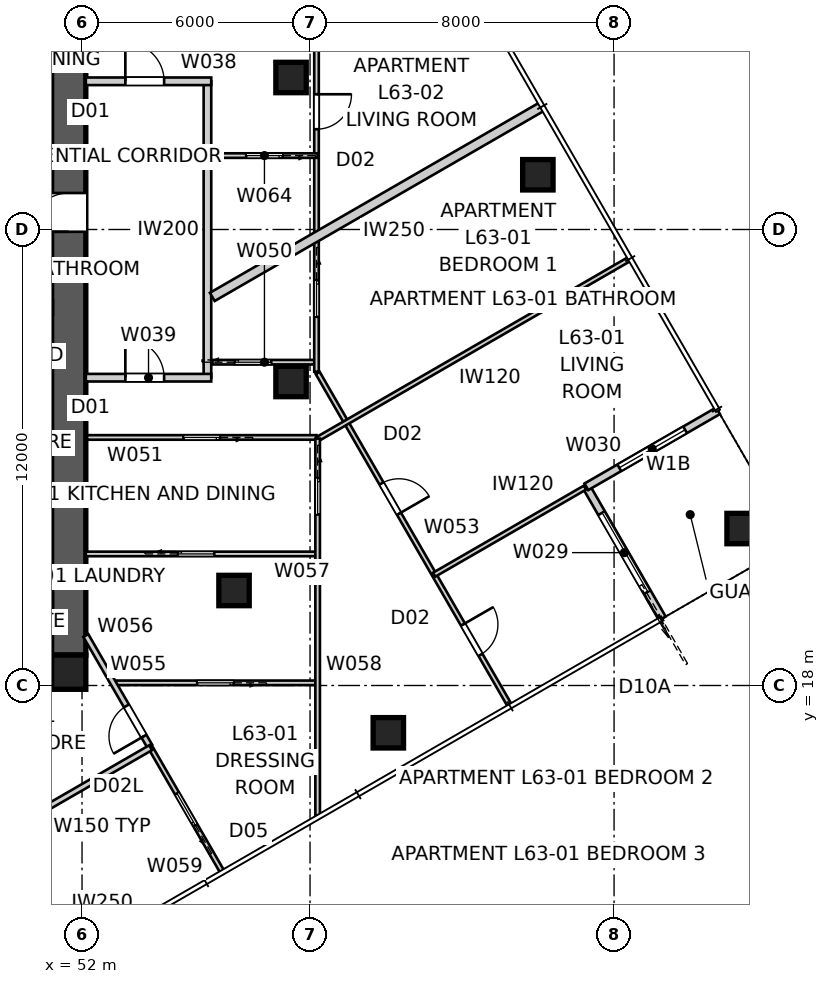
"""IFC4 building model, lengths in metres.
Left out: names, types, materials, properties, quantities, classifications, styles, units other than length and angle.
Written with IfcOpenShell. Run it as: python <this file> out.ifc"""

import sys

from ifc_helpers import new_model, si_unit, direction, frame, frame_2d, origin, origin_2d, place, context, subcontext, project, spatial, polyline, rectangle, outline, extrude, element, fill, save


model = new_model("IFC4")
c1 = context("Model", 3, precision=1e-05, world=origin(), true_north=direction((0.0, 1.0)))
c2 = subcontext(c1, "Body", "Model", "MODEL_VIEW")
j1 = project(units=[si_unit("LENGTHUNIT", "METRE"), si_unit("PLANEANGLEUNIT", "RADIAN")], contexts=[c1])
p1 = place(None, origin())
s1 = spatial("IfcSite", under=j1, at=p1, CompositionType="ELEMENT")
p2 = place(p1, origin())
s2 = spatial("IfcBuilding", under=s1, at=p2, CompositionType="ELEMENT")
p3 = place(p2, frame((0.0, 0.0, 228.6)))
s3 = spatial("IfcBuildingStorey", under=s2, at=p3, CompositionType="ELEMENT", Elevation=228.6)
p4 = place(p3, frame((51.2, 18.35, 0.0), z_axis=(0.0, 0.0, 1.0), x_axis=(-1.0, 0.0, 0.0)))
e1 = element("IfcWall", 1, at=p4, inside=s3, PredefinedType="SHEAR", context=c2, shape_type="SweptSolid", body=[
    extrude(outline(polyline([(0.0, -0.45), (22.4, -0.45), (22.4, -0.025), (22.85, -0.025), (22.85, 0.025), (22.4, 0.025), (22.4, 0.45), (0.0, 0.45), (0.0, 0.025), (-0.45, 0.025), (-0.45, -0.025), (0.0, -0.025), (0.0, -0.45)])), origin(), (0.0, 0.0, 1.0), 3.4),
])
p5 = place(p3, frame((51.65, 18.8, 0.0), z_axis=(0.0, 0.0, 1.0), x_axis=(0.0, 1.0, 0.0)))
e2 = element("IfcWall", 2, at=p5, inside=s3, PredefinedType="SHEAR", context=c2, shape_type="SweptSolid", body=[
    extrude(outline(polyline([(0.0, -0.45), (22.4, -0.45), (22.4, -0.025), (22.85, -0.025), (22.85, 0.025), (22.4, 0.025), (22.4, 0.45), (0.0, 0.45), (0.0, 0.025), (-0.45, 0.025), (-0.45, -0.025), (0.0, -0.025), (0.0, -0.45)])), origin(), (0.0, 0.0, 1.0), 3.4),
])
p6 = place(p5, frame((11.14, 0.0, 0.0)))
e3 = element("IfcOpeningElement", 3, at=p6, cuts=e2, PredefinedType="OPENING", context=c2, shape_type="SweptSolid", body=[
    extrude(rectangle(XDim=1.02, YDim=2.4, at=frame_2d((0.51, 1.2))), frame((0.0, 0.46, 0.0), z_axis=(0.0, -1.0, 0.0), x_axis=(1.0, 0.0, 0.0)), (0.0, 0.0, 1.0), 0.92),
])
p7 = place(p3, frame((51.65, 18.35, 0.0), z_axis=(0.0, 0.0, 1.0), x_axis=(1.0, 0.0, 0.0)))
e4 = element("IfcColumn", 4, at=p7, inside=s3, PredefinedType="COLUMN", context=c2, shape_type="SweptSolid", body=[
    extrude(rectangle(XDim=0.9, YDim=0.9, at=origin_2d()), origin(), (0.0, 0.0, 1.0), 3.4),
])
for number, where, z_axis, x_axis in (
    (5, (60.06, 16.755, 0.0), (0.0, 0.0, 1.0), (1.0, 0.0, 0.0)),
    (6, (69.37, 22.13, 0.0), (0.0, 0.0, 1.0), (1.0, 0.0, 0.0)),
    (7, (63.995, 31.44, 0.0), (0.0, 0.0, 1.0), (1.0, 0.0, 0.0)),
    (8, (57.5, 26.0, 0.0), (0.0, 0.0, 1.0), (1.0, 0.0, 0.0)),
    (9, (57.5, 34.0, 0.0), (0.0, 0.0, 1.0), (1.0, 0.0, 0.0)),
    (10, (56.0, 20.5, 0.0), (0.0, 0.0, 1.0), (1.0, 0.0, 0.0)),
):
    element("IfcColumn", number, at=place(p3, frame(where, z_axis=z_axis, x_axis=x_axis)), inside=s3, PredefinedType="COLUMN", context=c2, shape_type="SweptSolid", body=[
        extrude(rectangle(XDim=0.8, YDim=0.8, at=origin_2d()), origin(), (0.0, 0.0, 1.0), 3.4),
    ])
p8 = place(p3, frame((67.271, 19.764, 0.0), z_axis=(0.0, 0.0, 1.0), x_axis=(-0.49999894854, 0.866026010844, 0.0)))
e11 = element("IfcWall", 11, at=p8, inside=s3, PredefinedType="SOLIDWALL", context=c2, shape_type="SweptSolid", body=[
    extrude(rectangle(XDim=4.0, YDim=0.2, at=frame_2d((2.0, 0.0))), origin(), (0.0, 0.0, 1.0), 3.25),
])
p9 = place(p8, frame((0.8, 0.0, 0.0)))
e12 = element("IfcOpeningElement", 12, at=p9, cuts=e11, PredefinedType="OPENING", context=c2, shape_type="SweptSolid", body=[
    extrude(rectangle(XDim=2.4, YDim=2.1, at=frame_2d((1.2, 1.05))), frame((0.0, 0.11, 0.0), z_axis=(0.0, -1.0, 0.0), x_axis=(1.0, 0.0, 0.0)), (0.0, 0.0, 1.0), 0.22),
])
p10 = place(p3, frame((65.271, 23.229, 0.0), z_axis=(0.0, 0.0, 1.0), x_axis=(0.866026010844, 0.49999894854, 0.0)))
e13 = element("IfcWall", 13, at=p10, inside=s3, PredefinedType="SOLIDWALL", context=c2, shape_type="SweptSolid", body=[
    extrude(rectangle(XDim=4.0, YDim=0.2, at=frame_2d((2.0, 0.0))), origin(), (0.0, 0.0, 1.0), 3.25),
])
p11 = place(p10, frame((1.0, 0.0, 0.45)))
e14 = element("IfcOpeningElement", 14, at=p11, cuts=e13, PredefinedType="OPENING", context=c2, shape_type="SweptSolid", body=[
    extrude(rectangle(XDim=2.0, YDim=1.8, at=frame_2d((1.0, 0.9))), frame((0.0, 0.11, 0.0), z_axis=(0.0, -1.0, 0.0), x_axis=(1.0, 0.0, 0.0)), (0.0, 0.0, 1.0), 0.22),
])
p12 = place(p3, frame((55.3, 26.1, 0.0), z_axis=(0.0, 0.0, 1.0), x_axis=(0.0, 1.0, 0.0)))
e15 = element("IfcWall", 15, at=p12, inside=s3, PredefinedType="PARTITIONING", context=c2, shape_type="SweptSolid", body=[
    extrude(rectangle(XDim=7.8, YDim=0.2, at=frame_2d((3.9, 0.0))), origin(), (0.0, 0.0, 1.0), 3.25),
])
p13 = place(p3, frame((52.1, 33.9, 0.0), z_axis=(0.0, 0.0, 1.0), x_axis=(1.0, 0.0, 0.0)))
e16 = element("IfcWall", 16, at=p13, inside=s3, PredefinedType="PARTITIONING", context=c2, shape_type="SweptSolid", body=[
    extrude(rectangle(XDim=3.3, YDim=0.2, at=frame_2d((1.65, 0.0))), origin(), (0.0, 0.0, 1.0), 3.25),
])
p14 = place(p13, frame((1.04, 0.0, 0.0)))
e17 = element("IfcOpeningElement", 17, at=p14, cuts=e16, PredefinedType="OPENING", context=c2, shape_type="SweptSolid", body=[
    extrude(rectangle(XDim=1.02, YDim=2.34, at=frame_2d((0.51, 1.17))), frame((0.0, 0.11, 0.0), z_axis=(0.0, -1.0, 0.0), x_axis=(1.0, 0.0, 0.0)), (0.0, 0.0, 1.0), 0.22),
])
p15 = place(p3, frame((52.1, 26.1, 0.0), z_axis=(0.0, 0.0, 1.0), x_axis=(1.0, 0.0, 0.0)))
e18 = element("IfcWall", 18, at=p15, inside=s3, PredefinedType="PARTITIONING", context=c2, shape_type="SweptSolid", body=[
    extrude(rectangle(XDim=3.3, YDim=0.2, at=frame_2d((1.65, 0.0))), origin(), (0.0, 0.0, 1.0), 3.25),
])
p16 = place(p15, frame((1.04, 0.0, 0.0)))
e19 = element("IfcOpeningElement", 19, at=p16, cuts=e18, PredefinedType="OPENING", context=c2, shape_type="SweptSolid", body=[
    extrude(rectangle(XDim=1.02, YDim=2.34, at=frame_2d((0.51, 1.17))), frame((0.0, 0.11, 0.0), z_axis=(0.0, -1.0, 0.0), x_axis=(1.0, 0.0, 0.0)), (0.0, 0.0, 1.0), 0.22),
])
p17 = place(p3, frame((64.111, 33.239, 0.0), z_axis=(0.0, 0.0, 1.0), x_axis=(-0.866024190901, -0.50000210077, 0.0)))
e20 = element("IfcWall", 20, at=p17, inside=s3, PredefinedType="PARTITIONING", context=c2, shape_type="SweptSolid", body=[
    extrude(rectangle(XDim=10.026, YDim=0.25, at=frame_2d((5.013, 0.0))), origin(), (0.0, 0.0, 1.0), 3.25),
])
p18 = place(p3, frame((51.25, 10.514, 0.0), z_axis=(0.0, 0.0, 1.0), x_axis=(-0.500008511703, 0.866020489494, 0.0)))
e21 = element("IfcWall", 21, at=p18, inside=s3, PredefinedType="PARTITIONING", context=c2, shape_type="SweptSolid", body=[
    extrude(rectangle(XDim=8.496, YDim=0.25, at=frame_2d((4.248, 0.0))), origin(), (0.0, 0.0, 1.0), 3.25),
])
p19 = place(p3, frame((55.43, 26.508, 0.0), z_axis=(0.0, 0.0, 1.0), x_axis=(1.0, 0.0, 0.0)))
e22 = element("IfcWall", 22, at=p19, inside=s3, PredefinedType="PARTITIONING", context=c2, shape_type="SweptSolid", body=[
    extrude(rectangle(XDim=2.74, YDim=0.12, at=frame_2d((1.37, 0.0))), origin(), (0.0, 0.0, 1.0), 3.25),
])
p20 = place(p19, frame((0.59, 0.0, 0.0)))
e23 = element("IfcOpeningElement", 23, at=p20, cuts=e22, PredefinedType="OPENING", context=c2, shape_type="SweptSolid", body=[
    extrude(rectangle(XDim=0.96, YDim=2.1, at=frame_2d((0.48, 1.05))), frame((0.0, 0.07, 0.0), z_axis=(0.0, -1.0, 0.0), x_axis=(1.0, 0.0, 0.0)), (0.0, 0.0, 1.0), 0.14),
])
p21 = place(p3, frame((58.17, 24.528, 0.0), z_axis=(0.0, 0.0, 1.0), x_axis=(-1.0, 0.0, 0.0)))
e24 = element("IfcWall", 24, at=p21, inside=s3, PredefinedType="PARTITIONING", context=c2, shape_type="SweptSolid", body=[
    extrude(rectangle(XDim=6.04, YDim=0.12, at=frame_2d((3.02, 0.0))), origin(), (0.0, 0.0, 1.0), 2.35),
])
p22 = place(p21, frame((2.54, 0.0, 0.0)))
e25 = element("IfcOpeningElement", 25, at=p22, cuts=e24, PredefinedType="OPENING", context=c2, shape_type="SweptSolid", body=[
    extrude(rectangle(XDim=0.96, YDim=2.1, at=frame_2d((0.48, 1.05))), frame((0.0, 0.07, 0.0), z_axis=(0.0, -1.0, 0.0), x_axis=(1.0, 0.0, 0.0)), (0.0, 0.0, 1.0), 0.14),
])
p23 = place(p3, frame((58.171, 40.491, 0.0), z_axis=(0.0, 0.0, 1.0), x_axis=(-5.1455328e-05, -0.999999998676, 0.0)))
e26 = element("IfcWall", 26, at=p23, inside=s3, PredefinedType="PARTITIONING", context=c2, shape_type="SweptSolid", body=[
    extrude(rectangle(XDim=14.234, YDim=0.12, at=frame_2d((7.117, 0.0))), origin(), (0.0, 0.0, 1.0), 3.25),
])
p24 = place(p23, frame((6.932, 0.0, 0.0)))
e27 = element("IfcOpeningElement", 27, at=p24, cuts=e26, PredefinedType="OPENING", context=c2, shape_type="SweptSolid", body=[
    extrude(rectangle(XDim=0.92, YDim=2.34, at=frame_2d((0.46, 1.17))), frame((0.0, 0.07, 0.0), z_axis=(0.0, -1.0, 0.0), x_axis=(1.0, 0.0, 0.0)), (0.0, 0.0, 1.0), 0.14),
])
p25 = place(p23, frame((11.829, 0.0, 0.0)))
e28 = element("IfcOpeningElement", 28, at=p25, cuts=e26, PredefinedType="OPENING", context=c2, shape_type="SweptSolid", body=[
    extrude(rectangle(XDim=0.96, YDim=2.1, at=frame_2d((0.48, 1.05))), frame((0.0, 0.07, 0.0), z_axis=(0.0, -1.0, 0.0), x_axis=(1.0, 0.0, 0.0)), (0.0, 0.0, 1.0), 0.14),
])
p26 = place(p23, frame((1.964, 0.0, 0.0)))
e29 = element("IfcOpeningElement", 29, at=p26, cuts=e26, PredefinedType="OPENING", context=c2, shape_type="SweptSolid", body=[
    extrude(rectangle(XDim=0.96, YDim=2.1, at=frame_2d((0.48, 1.05))), frame((0.0, 0.07, 0.0), z_axis=(0.0, -1.0, 0.0), x_axis=(1.0, 0.0, 0.0)), (0.0, 0.0, 1.0), 0.14),
])
p27 = place(p3, frame((58.2, 26.226, 0.0), z_axis=(0.0, 0.0, 1.0), x_axis=(0.499992604493, -0.86602967354, 0.0)))
e30 = element("IfcWall", 30, at=p27, inside=s3, PredefinedType="PARTITIONING", context=c2, shape_type="SweptSolid", body=[
    extrude(rectangle(XDim=10.092, YDim=0.12, at=frame_2d((5.046, 0.0))), origin(), (0.0, 0.0, 1.0), 3.25),
])
p28 = place(p27, frame((3.359, 0.0, 0.0)))
e31 = element("IfcOpeningElement", 31, at=p28, cuts=e30, PredefinedType="OPENING", context=c2, shape_type="SweptSolid", body=[
    extrude(rectangle(XDim=0.92, YDim=2.34, at=frame_2d((0.46, 1.17))), frame((0.0, 0.07, 0.0), z_axis=(0.0, -1.0, 0.0), x_axis=(1.0, 0.0, 0.0)), (0.0, 0.0, 1.0), 0.14),
])
p29 = place(p27, frame((7.646, 0.0, 0.0)))
e32 = element("IfcOpeningElement", 32, at=p29, cuts=e30, PredefinedType="OPENING", context=c2, shape_type="SweptSolid", body=[
    extrude(rectangle(XDim=0.92, YDim=2.34, at=frame_2d((0.46, 1.17))), frame((0.0, 0.07, 0.0), z_axis=(0.0, -1.0, 0.0), x_axis=(1.0, 0.0, 0.0)), (0.0, 0.0, 1.0), 0.14),
])
p30 = place(p3, frame((66.388, 29.214, 0.0), z_axis=(0.0, 0.0, 1.0), x_axis=(-0.86602907136, -0.49999364752, 0.0)))
e33 = element("IfcWall", 33, at=p30, inside=s3, PredefinedType="PARTITIONING", context=c2, shape_type="SweptSolid", body=[
    extrude(rectangle(XDim=9.455, YDim=0.12, at=frame_2d((4.728, 0.0))), origin(), (0.0, 0.0, 1.0), 3.25),
])
p31 = place(p3, frame((58.2, 18.07, 0.0), z_axis=(0.0, 0.0, 1.0), x_axis=(-1.0, 0.0, 0.0)))
e34 = element("IfcWall", 34, at=p31, inside=s3, PredefinedType="PARTITIONING", context=c2, shape_type="SweptSolid", body=[
    extrude(rectangle(XDim=5.381, YDim=0.12, at=frame_2d((2.691, 0.0))), origin(), (0.0, 0.0, 1.0), 3.25),
])
p32 = place(p31, frame((2.211, 0.0, 0.0)))
e35 = element("IfcOpeningElement", 35, at=p32, cuts=e34, PredefinedType="OPENING", context=c2, shape_type="SweptSolid", body=[
    extrude(rectangle(XDim=0.96, YDim=2.1, at=frame_2d((0.48, 1.05))), frame((0.0, 0.07, 0.0), z_axis=(0.0, -1.0, 0.0), x_axis=(1.0, 0.0, 0.0)), (0.0, 0.0, 1.0), 0.14),
])
p33 = place(p3, frame((53.779, 16.406, 0.0), z_axis=(0.0, 0.0, 1.0), x_axis=(-0.499969954228, 0.866042750024, 0.0)))
e36 = element("IfcWall", 36, at=p33, inside=s3, PredefinedType="SOLIDWALL", context=c2, shape_type="SweptSolid", body=[
    extrude(rectangle(XDim=3.359, YDim=0.15, at=frame_2d((1.679, 0.0))), origin(), (0.0, 0.0, 1.0), 3.25),
])
p34 = place(p33, frame((0.301, 0.0, 0.0)))
e37 = element("IfcOpeningElement", 37, at=p34, cuts=e36, PredefinedType="OPENING", context=c2, shape_type="SweptSolid", body=[
    extrude(rectangle(XDim=0.92, YDim=2.1, at=frame_2d((0.46, 1.05))), frame((0.0, 0.085, 0.0), z_axis=(0.0, -1.0, 0.0), x_axis=(1.0, 0.0, 0.0)), (0.0, 0.0, 1.0), 0.17),
])
p35 = place(p3, frame((52.1, 21.462, 0.0), z_axis=(0.0, 0.0, 1.0), x_axis=(1.0, 0.0, 0.0)))
e38 = element("IfcWall", 38, at=p35, inside=s3, PredefinedType="PARTITIONING", context=c2, shape_type="SweptSolid", body=[
    extrude(rectangle(XDim=6.1, YDim=0.12, at=frame_2d((3.05, 0.0))), origin(), (0.0, 0.0, 1.0), 3.25),
])
p36 = place(p35, frame((2.42, 0.0, 0.0)))
e39 = element("IfcOpeningElement", 39, at=p36, cuts=e38, PredefinedType="OPENING", context=c2, shape_type="SweptSolid", body=[
    extrude(rectangle(XDim=0.96, YDim=2.1, at=frame_2d((0.48, 1.05))), frame((0.0, 0.07, 0.0), z_axis=(0.0, -1.0, 0.0), x_axis=(1.0, 0.0, 0.0)), (0.0, 0.0, 1.0), 0.14),
])
p37 = place(p3, frame((58.2, 24.498, 0.0), z_axis=(0.0, 0.0, 1.0), x_axis=(0.0, -1.0, 0.0)))
e40 = element("IfcWall", 40, at=p37, inside=s3, PredefinedType="PARTITIONING", context=c2, shape_type="SweptSolid", body=[
    extrude(rectangle(XDim=9.925, YDim=0.12, at=frame_2d((4.962, 0.0))), origin(), (0.0, 0.0, 1.0), 3.25),
])
p38 = place(p37, frame((1.038, 0.0, 0.0)))
e41 = element("IfcOpeningElement", 41, at=p38, cuts=e40, PredefinedType="OPENING", context=c2, shape_type="SweptSolid", body=[
    extrude(rectangle(XDim=0.96, YDim=2.1, at=frame_2d((0.48, 1.05))), frame((0.0, 0.07, 0.0), z_axis=(0.0, -1.0, 0.0), x_axis=(1.0, 0.0, 0.0)), (0.0, 0.0, 1.0), 0.14),
])
p39 = place(p3, frame((55.678, 13.117, 0.0), z_axis=(0.0, 0.0, 1.0), x_axis=(-0.500024807712, 0.866011080572, 0.0)))
e42 = element("IfcWall", 42, at=p39, inside=s3, PredefinedType="PARTITIONING", context=c2, shape_type="SweptSolid", body=[
    extrude(rectangle(XDim=3.798, YDim=0.12, at=frame_2d((1.899, 0.0))), origin(), (0.0, 0.0, 1.0), 3.25),
])
p40 = place(p39, frame((1.399, 0.0, 0.0)))
e43 = element("IfcOpeningElement", 43, at=p40, cuts=e42, PredefinedType="OPENING", context=c2, shape_type="SweptSolid", body=[
    extrude(rectangle(XDim=0.96, YDim=2.1, at=frame_2d((0.48, 1.05))), frame((0.0, 0.07, 0.0), z_axis=(0.0, -1.0, 0.0), x_axis=(1.0, 0.0, 0.0)), (0.0, 0.0, 1.0), 0.14),
])
p41 = place(p3, frame((49.955, 14.14, 0.0), z_axis=(0.0, 0.0, 1.0), x_axis=(0.866017295027, 0.500014044516, 0.0)))
e44 = element("IfcWall", 44, at=p41, inside=s3, PredefinedType="SOLIDWALL", context=c2, shape_type="SweptSolid", body=[
    extrude(rectangle(XDim=4.445, YDim=0.15, at=frame_2d((2.223, 0.0))), origin(), (0.0, 0.0, 1.0), 3.25),
])
p42 = place(p3, frame((65.237, 23.208, 0.0), z_axis=(0.0, 0.0, 1.0), x_axis=(-0.866025975094, -0.499999010461, 0.0)))
e45 = element("IfcWall", 45, at=p42, inside=s3, PredefinedType="PARTITIONING", context=c2, shape_type="SweptSolid", body=[
    extrude(rectangle(XDim=4.585, YDim=0.12, at=frame_2d((2.292, 0.0))), origin(), (0.0, 0.0, 1.0), 3.25),
])
p43 = place(p3, frame((58.2, 31.945, 0.0), z_axis=(0.0, 0.0, 1.0), x_axis=(-1.0, 0.0, 0.0)))
e46 = element("IfcWall", 46, at=p43, inside=s3, PredefinedType="PARTITIONING", context=c2, shape_type="SweptSolid", body=[
    extrude(rectangle(XDim=2.8, YDim=0.12, at=frame_2d((1.4, 0.0))), origin(), (0.0, 0.0, 1.0), 3.25),
])
p44 = place(p43, frame((0.92, 0.0, 0.0)))
e47 = element("IfcOpeningElement", 47, at=p44, cuts=e46, PredefinedType="OPENING", context=c2, shape_type="SweptSolid", body=[
    extrude(rectangle(XDim=0.96, YDim=2.1, at=frame_2d((0.48, 1.05))), frame((0.0, 0.07, 0.0), z_axis=(0.0, -1.0, 0.0), x_axis=(1.0, 0.0, 0.0)), (0.0, 0.0, 1.0), 0.14),
])
p45 = place(p9, origin())
e48 = element("IfcDoor", 48, at=p45, inside=s3, OperationType="SLIDING_TO_LEFT", PredefinedType="DOOR", context=c2, shape_type="SweptSolid", body=[
    extrude(rectangle(XDim=2.4, YDim=2.1, at=frame_2d((1.2, 1.05))), frame((0.0, 0.025, 0.0), z_axis=(0.0, -1.0, 0.0), x_axis=(1.0, 0.0, 0.0)), (0.0, 0.0, 1.0), 0.05),
])
fill(e12, e48)
p46 = place(p11, origin())
e49 = element("IfcWindow", 49, at=p46, inside=s3, PartitioningType="SINGLE_PANEL", PredefinedType="WINDOW", context=c2, shape_type="SweptSolid", body=[
    extrude(rectangle(XDim=2.0, YDim=1.8, at=frame_2d((1.0, 0.9))), frame((0.0, 0.03, 0.0), z_axis=(0.0, -1.0, 0.0), x_axis=(1.0, 0.0, 0.0)), (0.0, 0.0, 1.0), 0.06),
])
fill(e14, e49)
p47 = place(p16, origin())
e50 = element("IfcDoor", 50, at=p47, inside=s3, OperationType="SINGLE_SWING_LEFT", PredefinedType="DOOR", context=c2, shape_type="SweptSolid", body=[
    extrude(rectangle(XDim=1.02, YDim=2.34, at=frame_2d((0.51, 1.17))), frame((0.0, 0.025, 0.0), z_axis=(0.0, -1.0, 0.0), x_axis=(1.0, 0.0, 0.0)), (0.0, 0.0, 1.0), 0.05),
])
fill(e19, e50)
p48 = place(p14, origin())
e51 = element("IfcDoor", 51, at=p48, inside=s3, OperationType="SINGLE_SWING_LEFT", PredefinedType="DOOR", context=c2, shape_type="SweptSolid", body=[
    extrude(rectangle(XDim=1.02, YDim=2.34, at=frame_2d((0.51, 1.17))), frame((0.0, 0.025, 0.0), z_axis=(0.0, -1.0, 0.0), x_axis=(1.0, 0.0, 0.0)), (0.0, 0.0, 1.0), 0.05),
])
fill(e17, e51)
p49 = place(p22, origin())
e52 = element("IfcDoor", 52, at=p49, inside=s3, OperationType="SLIDING_TO_LEFT", PredefinedType="DOOR", context=c2, shape_type="SweptSolid", body=[
    extrude(rectangle(XDim=0.96, YDim=2.1, at=frame_2d((0.48, 1.05))), frame((0.0, 0.025, 0.0), z_axis=(0.0, -1.0, 0.0), x_axis=(1.0, 0.0, 0.0)), (0.0, 0.0, 1.0), 0.05),
])
fill(e25, e52)
p50 = place(p20, origin())
e53 = element("IfcDoor", 53, at=p50, inside=s3, OperationType="SLIDING_TO_LEFT", PredefinedType="DOOR", context=c2, shape_type="SweptSolid", body=[
    extrude(rectangle(XDim=0.96, YDim=2.1, at=frame_2d((0.48, 1.05))), frame((0.0, 0.025, 0.0), z_axis=(0.0, -1.0, 0.0), x_axis=(1.0, 0.0, 0.0)), (0.0, 0.0, 1.0), 0.05),
])
fill(e23, e53)
p51 = place(p24, origin())
e54 = element("IfcDoor", 54, at=p51, inside=s3, OperationType="SINGLE_SWING_LEFT", PredefinedType="DOOR", context=c2, shape_type="SweptSolid", body=[
    extrude(rectangle(XDim=0.92, YDim=2.34, at=frame_2d((0.46, 1.17))), frame((0.0, 0.025, 0.0), z_axis=(0.0, -1.0, 0.0), x_axis=(1.0, 0.0, 0.0)), (0.0, 0.0, 1.0), 0.05),
])
fill(e27, e54)
p52 = place(p44, origin())
e55 = element("IfcDoor", 55, at=p52, inside=s3, OperationType="SLIDING_TO_LEFT", PredefinedType="DOOR", context=c2, shape_type="SweptSolid", body=[
    extrude(rectangle(XDim=0.96, YDim=2.1, at=frame_2d((0.48, 1.05))), frame((0.0, 0.025, 0.0), z_axis=(0.0, -1.0, 0.0), x_axis=(1.0, 0.0, 0.0)), (0.0, 0.0, 1.0), 0.05),
])
fill(e47, e55)
p53 = place(p36, origin())
e56 = element("IfcDoor", 56, at=p53, inside=s3, OperationType="SLIDING_TO_LEFT", PredefinedType="DOOR", context=c2, shape_type="SweptSolid", body=[
    extrude(rectangle(XDim=0.96, YDim=2.1, at=frame_2d((0.48, 1.05))), frame((0.0, 0.025, 0.0), z_axis=(0.0, -1.0, 0.0), x_axis=(1.0, 0.0, 0.0)), (0.0, 0.0, 1.0), 0.05),
])
fill(e39, e56)
p54 = place(p38, origin())
e57 = element("IfcDoor", 57, at=p54, inside=s3, OperationType="SLIDING_TO_LEFT", PredefinedType="DOOR", context=c2, shape_type="SweptSolid", body=[
    extrude(rectangle(XDim=0.96, YDim=2.1, at=frame_2d((0.48, 1.05))), frame((0.0, 0.025, 0.0), z_axis=(0.0, -1.0, 0.0), x_axis=(1.0, 0.0, 0.0)), (0.0, 0.0, 1.0), 0.05),
])
fill(e41, e57)
p55 = place(p25, origin())
e58 = element("IfcDoor", 58, at=p55, inside=s3, OperationType="SLIDING_TO_LEFT", PredefinedType="DOOR", context=c2, shape_type="SweptSolid", body=[
    extrude(rectangle(XDim=0.96, YDim=2.1, at=frame_2d((0.48, 1.05))), frame((0.0, 0.025, 0.0), z_axis=(0.0, -1.0, 0.0), x_axis=(1.0, 0.0, 0.0)), (0.0, 0.0, 1.0), 0.05),
])
fill(e28, e58)
p56 = place(p32, origin())
e59 = element("IfcDoor", 59, at=p56, inside=s3, OperationType="SLIDING_TO_LEFT", PredefinedType="DOOR", context=c2, shape_type="SweptSolid", body=[
    extrude(rectangle(XDim=0.96, YDim=2.1, at=frame_2d((0.48, 1.05))), frame((0.0, 0.025, 0.0), z_axis=(0.0, -1.0, 0.0), x_axis=(1.0, 0.0, 0.0)), (0.0, 0.0, 1.0), 0.05),
])
fill(e35, e59)
p57 = place(p40, origin())
e60 = element("IfcDoor", 60, at=p57, inside=s3, OperationType="SLIDING_TO_LEFT", PredefinedType="DOOR", context=c2, shape_type="SweptSolid", body=[
    extrude(rectangle(XDim=0.96, YDim=2.1, at=frame_2d((0.48, 1.05))), frame((0.0, 0.025, 0.0), z_axis=(0.0, -1.0, 0.0), x_axis=(1.0, 0.0, 0.0)), (0.0, 0.0, 1.0), 0.05),
])
fill(e43, e60)
p58 = place(p34, origin())
e61 = element("IfcDoor", 61, at=p58, inside=s3, OperationType="SINGLE_SWING_LEFT", PredefinedType="DOOR", context=c2, shape_type="SweptSolid", body=[
    extrude(rectangle(XDim=0.92, YDim=2.1, at=frame_2d((0.46, 1.05))), frame((0.0, 0.025, 0.0), z_axis=(0.0, -1.0, 0.0), x_axis=(1.0, 0.0, 0.0)), (0.0, 0.0, 1.0), 0.05),
])
fill(e37, e61)
p59 = place(p28, origin())
e62 = element("IfcDoor", 62, at=p59, inside=s3, OperationType="SINGLE_SWING_RIGHT", PredefinedType="DOOR", context=c2, shape_type="SweptSolid", body=[
    extrude(rectangle(XDim=0.92, YDim=2.34, at=frame_2d((0.46, 1.17))), frame((0.0, 0.025, 0.0), z_axis=(0.0, -1.0, 0.0), x_axis=(1.0, 0.0, 0.0)), (0.0, 0.0, 1.0), 0.05),
])
fill(e31, e62)
p60 = place(p29, origin())
e63 = element("IfcDoor", 63, at=p60, inside=s3, OperationType="SINGLE_SWING_LEFT", PredefinedType="DOOR", context=c2, shape_type="SweptSolid", body=[
    extrude(rectangle(XDim=0.92, YDim=2.34, at=frame_2d((0.46, 1.17))), frame((0.0, 0.025, 0.0), z_axis=(0.0, -1.0, 0.0), x_axis=(1.0, 0.0, 0.0)), (0.0, 0.0, 1.0), 0.05),
])
fill(e32, e63)
p61 = place(p6, origin())
e64 = element("IfcDoor", 64, at=p61, inside=s3, OperationType="SINGLE_SWING_LEFT", PredefinedType="DOOR", context=c2, shape_type="SweptSolid", body=[
    extrude(rectangle(XDim=1.02, YDim=2.4, at=frame_2d((0.51, 1.2))), frame((0.0, 0.025, 0.0), z_axis=(0.0, -1.0, 0.0), x_axis=(1.0, 0.0, 0.0)), (0.0, 0.0, 1.0), 0.05),
])
fill(e3, e64)
save(model, sys.argv[1])
